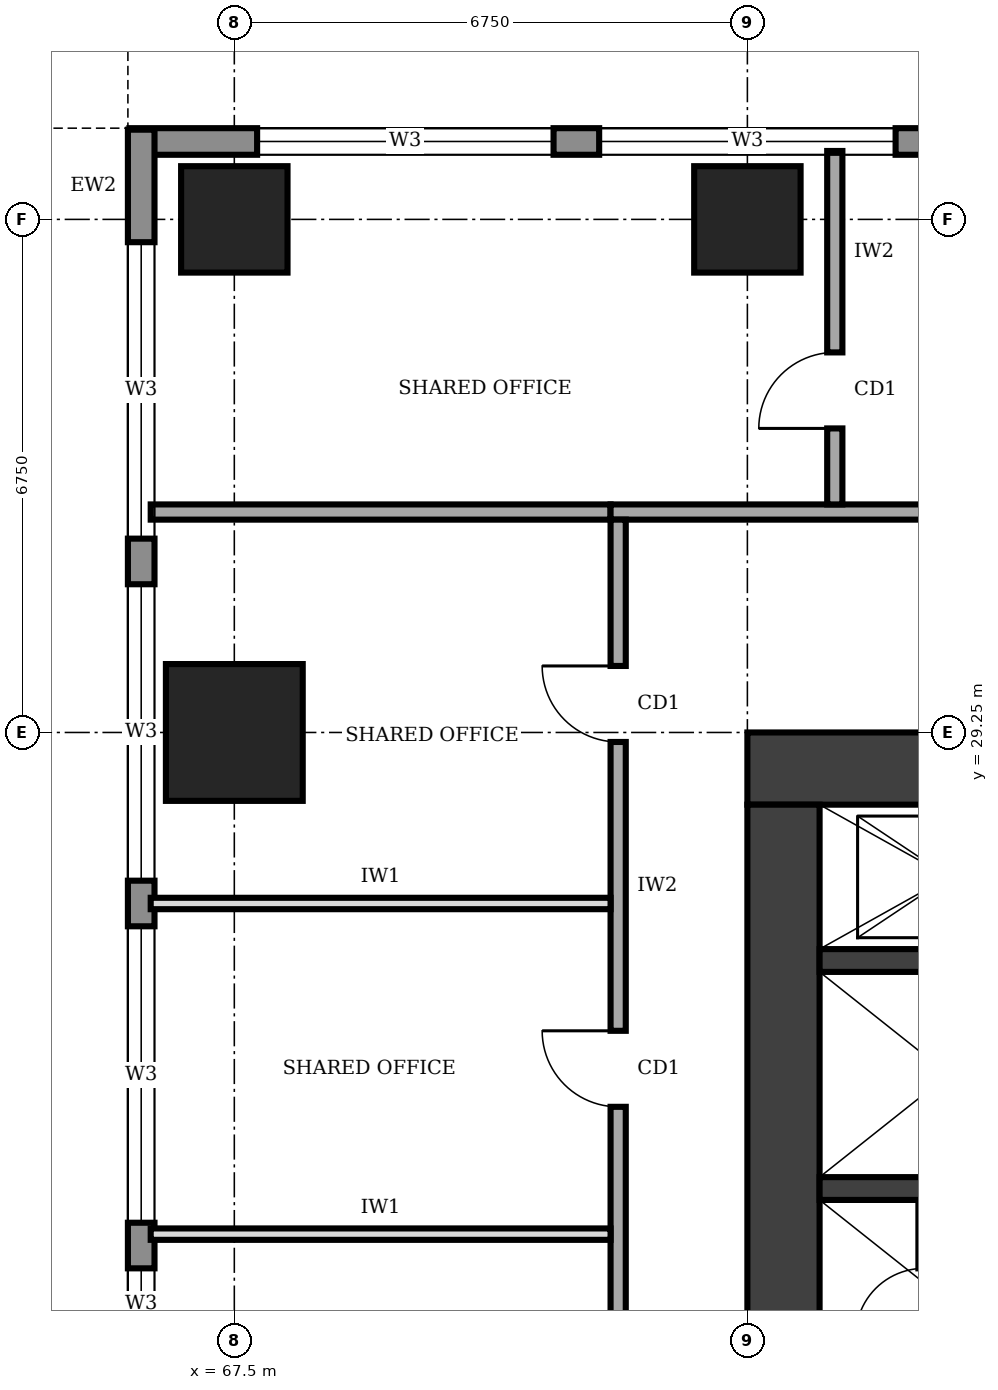
"""IFC4 building model, lengths in metres.
Left out: names, types, materials, properties, quantities, classifications, styles, units other than length and angle.
Written with IfcOpenShell. Run it as: python <this file> out.ifc"""

import sys

from ifc_helpers import new_model, si_unit, direction, frame, frame_2d, origin, origin_2d, place, context, subcontext, project, spatial, rectangle, extrude, element, fill, save


model = new_model("IFC4")
c1 = context("Model", 3, precision=1e-05, world=origin(), true_north=direction((0.0, 1.0)))
c2 = subcontext(c1, "Body", "Model", "MODEL_VIEW")
j1 = project(units=[si_unit("LENGTHUNIT", "METRE"), si_unit("PLANEANGLEUNIT", "RADIAN")], contexts=[c1])
p1 = place(None, origin())
s1 = spatial("IfcSite", under=j1, at=p1, CompositionType="ELEMENT")
p2 = place(p1, origin())
s2 = spatial("IfcBuilding", under=s1, at=p2, CompositionType="ELEMENT")
p3 = place(p2, frame((0.0, 0.0, 177.0)))
s3 = spatial("IfcBuildingStorey", under=s2, at=p3, CompositionType="ELEMENT", Elevation=177.0)
p4 = place(p3, frame((87.75, 28.775, 0.0), z_axis=(0.0, 0.0, 1.0), x_axis=(-1.0, 0.0, 0.0)))
e1 = element("IfcWall", 1, at=p4, inside=s3, PredefinedType="SHEAR", context=c2, shape_type="SweptSolid", body=[
    extrude(rectangle(XDim=13.5, YDim=0.95, at=frame_2d((6.75, 0.0))), origin(), (0.0, 0.0, 1.0), 4.0),
])
p5 = place(p4, frame((4.75, 0.0, 0.0)))
e2 = element("IfcOpeningElement", 2, at=p5, cuts=e1, PredefinedType="OPENING", context=c2, shape_type="SweptSolid", body=[
    extrude(rectangle(XDim=1.8, YDim=2.1, at=frame_2d((0.9, 1.05))), frame((0.0, 0.485, 0.0), z_axis=(0.0, -1.0, 0.0), x_axis=(1.0, 0.0, 0.0)), (0.0, 0.0, 1.0), 0.97),
])
p6 = place(p3, frame((74.725, 28.3, 0.0), z_axis=(0.0, 0.0, 1.0), x_axis=(0.0, -1.0, 0.0)))
e3 = element("IfcWall", 3, at=p6, inside=s3, PredefinedType="SHEAR", context=c2, shape_type="SweptSolid", body=[
    extrude(rectangle(XDim=16.1, YDim=0.95, at=frame_2d((8.05, 0.0))), origin(), (0.0, 0.0, 1.0), 4.0),
])
for number, where, z_axis, x_axis in (
    (4, (75.2, 23.25, 0.0), (0.0, 0.0, 1.0), (1.0, 0.0, 0.0)),
    (5, (75.2, 26.25, 0.0), (0.0, 0.0, 1.0), (1.0, 0.0, 0.0)),
):
    element("IfcWall", number, at=place(p3, frame(where, z_axis=z_axis, x_axis=x_axis)), inside=s3, PredefinedType="SHEAR", context=c2, shape_type="SweptSolid", body=[
        extrude(rectangle(XDim=3.4, YDim=0.3, at=frame_2d((1.7, 0.0))), origin(), (0.0, 0.0, 1.0), 4.0),
    ])
p7 = place(p3, frame((67.5, 29.25, 0.0), z_axis=(0.0, 0.0, 1.0), x_axis=(1.0, 0.0, 0.0)))
e6 = element("IfcColumn", 6, at=p7, inside=s3, PredefinedType="COLUMN", context=c2, shape_type="SweptSolid", body=[
    extrude(rectangle(XDim=1.8, YDim=1.8, at=origin_2d()), origin(), (0.0, 0.0, 1.0), 4.0),
])
for number, where, z_axis, x_axis in (
    (7, (67.5, 36.0, 0.0), (0.0, 0.0, 1.0), (1.0, 0.0, 0.0)),
    (8, (74.25, 36.0, 0.0), (0.0, 0.0, 1.0), (1.0, 0.0, 0.0)),
):
    element("IfcColumn", number, at=place(p3, frame(where, z_axis=z_axis, x_axis=x_axis)), inside=s3, PredefinedType="COLUMN", context=c2, shape_type="SweptSolid", body=[
        extrude(rectangle(XDim=1.4, YDim=1.4, at=origin_2d()), origin(), (0.0, 0.0, 1.0), 4.0),
    ])
p8 = place(p3, frame((96.03, 37.025, 0.0), z_axis=(0.0, 0.0, 1.0), x_axis=(-1.0, 0.0, 0.0)))
e9 = element("IfcWall", 9, at=p8, inside=s3, PredefinedType="STANDARD", context=c2, shape_type="SweptSolid", body=[
    extrude(rectangle(XDim=29.91, YDim=0.35, at=frame_2d((14.955, 0.0))), origin(), (0.0, 0.0, 1.0), 3.75),
])
p9 = place(p8, frame((24.33, 0.0, 0.95)))
e10 = element("IfcOpeningElement", 10, at=p9, cuts=e9, PredefinedType="OPENING", context=c2, shape_type="SweptSolid", body=[
    extrude(rectangle(XDim=3.9, YDim=1.8, at=frame_2d((1.95, 0.9))), frame((0.0, 0.185, 0.0), z_axis=(0.0, -1.0, 0.0), x_axis=(1.0, 0.0, 0.0)), (0.0, 0.0, 1.0), 0.37),
])
p10 = place(p8, frame((19.83, 0.0, 0.95)))
e11 = element("IfcOpeningElement", 11, at=p10, cuts=e9, PredefinedType="OPENING", context=c2, shape_type="SweptSolid", body=[
    extrude(rectangle(XDim=3.9, YDim=1.8, at=frame_2d((1.95, 0.9))), frame((0.0, 0.185, 0.0), z_axis=(0.0, -1.0, 0.0), x_axis=(1.0, 0.0, 0.0)), (0.0, 0.0, 1.0), 0.37),
])
p11 = place(p8, frame((15.33, 0.0, 0.95)))
e12 = element("IfcOpeningElement", 12, at=p11, cuts=e9, PredefinedType="OPENING", context=c2, shape_type="SweptSolid", body=[
    extrude(rectangle(XDim=3.9, YDim=1.8, at=frame_2d((1.95, 0.9))), frame((0.0, 0.185, 0.0), z_axis=(0.0, -1.0, 0.0), x_axis=(1.0, 0.0, 0.0)), (0.0, 0.0, 1.0), 0.37),
])
p12 = place(p8, frame((10.83, 0.0, 0.95)))
e13 = element("IfcOpeningElement", 13, at=p12, cuts=e9, PredefinedType="OPENING", context=c2, shape_type="SweptSolid", body=[
    extrude(rectangle(XDim=3.9, YDim=1.8, at=frame_2d((1.95, 0.9))), frame((0.0, 0.185, 0.0), z_axis=(0.0, -1.0, 0.0), x_axis=(1.0, 0.0, 0.0)), (0.0, 0.0, 1.0), 0.37),
])
p13 = place(p8, frame((6.33, 0.0, 0.95)))
e14 = element("IfcOpeningElement", 14, at=p13, cuts=e9, PredefinedType="OPENING", context=c2, shape_type="SweptSolid", body=[
    extrude(rectangle(XDim=3.9, YDim=1.8, at=frame_2d((1.95, 0.9))), frame((0.0, 0.185, 0.0), z_axis=(0.0, -1.0, 0.0), x_axis=(1.0, 0.0, 0.0)), (0.0, 0.0, 1.0), 0.37),
])
p14 = place(p8, frame((1.83, 0.0, 0.95)))
e15 = element("IfcOpeningElement", 15, at=p14, cuts=e9, PredefinedType="OPENING", context=c2, shape_type="SweptSolid", body=[
    extrude(rectangle(XDim=3.9, YDim=1.8, at=frame_2d((1.95, 0.9))), frame((0.0, 0.185, 0.0), z_axis=(0.0, -1.0, 0.0), x_axis=(1.0, 0.0, 0.0)), (0.0, 0.0, 1.0), 0.37),
])
p15 = place(p3, frame((66.275, 37.18, 0.0), z_axis=(0.0, 0.0, 1.0), x_axis=(0.0, -1.0, 0.0)))
e16 = element("IfcWall", 16, at=p15, inside=s3, PredefinedType="STANDARD", context=c2, shape_type="SweptSolid", body=[
    extrude(rectangle(XDim=33.86, YDim=0.35, at=frame_2d((16.93, 0.0))), origin(), (0.0, 0.0, 1.0), 3.75),
])
p16 = place(p15, frame((28.48, 0.0, 0.95)))
e17 = element("IfcOpeningElement", 17, at=p16, cuts=e16, PredefinedType="OPENING", context=c2, shape_type="SweptSolid", body=[
    extrude(rectangle(XDim=3.9, YDim=1.8, at=frame_2d((1.95, 0.9))), frame((0.0, 0.185, 0.0), z_axis=(0.0, -1.0, 0.0), x_axis=(1.0, 0.0, 0.0)), (0.0, 0.0, 1.0), 0.37),
])
p17 = place(p15, frame((23.98, 0.0, 0.95)))
e18 = element("IfcOpeningElement", 18, at=p17, cuts=e16, PredefinedType="OPENING", context=c2, shape_type="SweptSolid", body=[
    extrude(rectangle(XDim=3.9, YDim=1.8, at=frame_2d((1.95, 0.9))), frame((0.0, 0.185, 0.0), z_axis=(0.0, -1.0, 0.0), x_axis=(1.0, 0.0, 0.0)), (0.0, 0.0, 1.0), 0.37),
])
p18 = place(p15, frame((19.48, 0.0, 0.95)))
e19 = element("IfcOpeningElement", 19, at=p18, cuts=e16, PredefinedType="OPENING", context=c2, shape_type="SweptSolid", body=[
    extrude(rectangle(XDim=3.9, YDim=1.8, at=frame_2d((1.95, 0.9))), frame((0.0, 0.185, 0.0), z_axis=(0.0, -1.0, 0.0), x_axis=(1.0, 0.0, 0.0)), (0.0, 0.0, 1.0), 0.37),
])
p19 = place(p15, frame((14.98, 0.0, 0.95)))
e20 = element("IfcOpeningElement", 20, at=p19, cuts=e16, PredefinedType="OPENING", context=c2, shape_type="SweptSolid", body=[
    extrude(rectangle(XDim=3.9, YDim=1.8, at=frame_2d((1.95, 0.9))), frame((0.0, 0.185, 0.0), z_axis=(0.0, -1.0, 0.0), x_axis=(1.0, 0.0, 0.0)), (0.0, 0.0, 1.0), 0.37),
])
p20 = place(p15, frame((10.48, 0.0, 0.95)))
e21 = element("IfcOpeningElement", 21, at=p20, cuts=e16, PredefinedType="OPENING", context=c2, shape_type="SweptSolid", body=[
    extrude(rectangle(XDim=3.9, YDim=1.8, at=frame_2d((1.95, 0.9))), frame((0.0, 0.185, 0.0), z_axis=(0.0, -1.0, 0.0), x_axis=(1.0, 0.0, 0.0)), (0.0, 0.0, 1.0), 0.37),
])
p21 = place(p15, frame((5.98, 0.0, 0.95)))
e22 = element("IfcOpeningElement", 22, at=p21, cuts=e16, PredefinedType="OPENING", context=c2, shape_type="SweptSolid", body=[
    extrude(rectangle(XDim=3.9, YDim=1.8, at=frame_2d((1.95, 0.9))), frame((0.0, 0.185, 0.0), z_axis=(0.0, -1.0, 0.0), x_axis=(1.0, 0.0, 0.0)), (0.0, 0.0, 1.0), 0.37),
])
p22 = place(p15, frame((1.48, 0.0, 0.95)))
e23 = element("IfcOpeningElement", 23, at=p22, cuts=e16, PredefinedType="OPENING", context=c2, shape_type="SweptSolid", body=[
    extrude(rectangle(XDim=3.9, YDim=1.8, at=frame_2d((1.95, 0.9))), frame((0.0, 0.185, 0.0), z_axis=(0.0, -1.0, 0.0), x_axis=(1.0, 0.0, 0.0)), (0.0, 0.0, 1.0), 0.37),
])
p23 = place(p3, frame((89.35, 32.15, 0.0), z_axis=(0.0, 0.0, 1.0), x_axis=(-1.0, 0.0, 0.0)))
e24 = element("IfcWall", 24, at=p23, inside=s3, PredefinedType="SOLIDWALL", context=c2, shape_type="SweptSolid", body=[
    extrude(rectangle(XDim=16.9, YDim=0.2, at=frame_2d((8.45, 0.0))), origin(), (0.0, 0.0, 1.0), 3.75),
])
p24 = place(p23, frame((3.575, 0.0, 0.0)))
e25 = element("IfcOpeningElement", 25, at=p24, cuts=e24, PredefinedType="OPENING", context=c2, shape_type="SweptSolid", body=[
    extrude(rectangle(XDim=1.0, YDim=2.1, at=frame_2d((0.5, 1.05))), frame((0.0, 0.11, 0.0), z_axis=(0.0, -1.0, 0.0), x_axis=(1.0, 0.0, 0.0)), (0.0, 0.0, 1.0), 0.22),
])
p25 = place(p3, frame((72.55, 32.05, 0.0), z_axis=(0.0, 0.0, 1.0), x_axis=(0.0, -1.0, 0.0)))
e26 = element("IfcWall", 26, at=p25, inside=s3, PredefinedType="SOLIDWALL", context=c2, shape_type="SweptSolid", body=[
    extrude(rectangle(XDim=23.05, YDim=0.2, at=frame_2d((11.525, 0.0))), origin(), (0.0, 0.0, 1.0), 3.75),
])
p26 = place(p25, frame((20.3, 0.0, 0.0)))
e27 = element("IfcOpeningElement", 27, at=p26, cuts=e26, PredefinedType="OPENING", context=c2, shape_type="SweptSolid", body=[
    extrude(rectangle(XDim=1.0, YDim=2.1, at=frame_2d((0.5, 1.05))), frame((0.0, 0.11, 0.0), z_axis=(0.0, -1.0, 0.0), x_axis=(1.0, 0.0, 0.0)), (0.0, 0.0, 1.0), 0.22),
])
p27 = place(p25, frame((15.875, 0.0, 0.0)))
e28 = element("IfcOpeningElement", 28, at=p27, cuts=e26, PredefinedType="OPENING", context=c2, shape_type="SweptSolid", body=[
    extrude(rectangle(XDim=1.0, YDim=2.1, at=frame_2d((0.5, 1.05))), frame((0.0, 0.11, 0.0), z_axis=(0.0, -1.0, 0.0), x_axis=(1.0, 0.0, 0.0)), (0.0, 0.0, 1.0), 0.22),
])
p28 = place(p25, frame((11.3, 0.0, 0.0)))
e29 = element("IfcOpeningElement", 29, at=p28, cuts=e26, PredefinedType="OPENING", context=c2, shape_type="SweptSolid", body=[
    extrude(rectangle(XDim=1.0, YDim=2.1, at=frame_2d((0.5, 1.05))), frame((0.0, 0.11, 0.0), z_axis=(0.0, -1.0, 0.0), x_axis=(1.0, 0.0, 0.0)), (0.0, 0.0, 1.0), 0.22),
])
p29 = place(p25, frame((6.725, 0.0, 0.0)))
e30 = element("IfcOpeningElement", 30, at=p29, cuts=e26, PredefinedType="OPENING", context=c2, shape_type="SweptSolid", body=[
    extrude(rectangle(XDim=1.0, YDim=2.1, at=frame_2d((0.5, 1.05))), frame((0.0, 0.11, 0.0), z_axis=(0.0, -1.0, 0.0), x_axis=(1.0, 0.0, 0.0)), (0.0, 0.0, 1.0), 0.22),
])
p30 = place(p25, frame((1.925, 0.0, 0.0)))
e31 = element("IfcOpeningElement", 31, at=p30, cuts=e26, PredefinedType="OPENING", context=c2, shape_type="SweptSolid", body=[
    extrude(rectangle(XDim=1.0, YDim=2.1, at=frame_2d((0.5, 1.05))), frame((0.0, 0.11, 0.0), z_axis=(0.0, -1.0, 0.0), x_axis=(1.0, 0.0, 0.0)), (0.0, 0.0, 1.0), 0.22),
])
p31 = place(p3, frame((75.4, 32.25, 0.0), z_axis=(0.0, 0.0, 1.0), x_axis=(0.0, 1.0, 0.0)))
e32 = element("IfcWall", 32, at=p31, inside=s3, PredefinedType="SOLIDWALL", context=c2, shape_type="SweptSolid", body=[
    extrude(rectangle(XDim=4.65, YDim=0.2, at=frame_2d((2.325, 0.0))), origin(), (0.0, 0.0, 1.0), 3.75),
])
p32 = place(p31, frame((1.0, 0.0, 0.0)))
e33 = element("IfcOpeningElement", 33, at=p32, cuts=e32, PredefinedType="OPENING", context=c2, shape_type="SweptSolid", body=[
    extrude(rectangle(XDim=1.0, YDim=2.1, at=frame_2d((0.5, 1.05))), frame((0.0, 0.11, 0.0), z_axis=(0.0, -1.0, 0.0), x_axis=(1.0, 0.0, 0.0)), (0.0, 0.0, 1.0), 0.22),
])
p33 = place(p3, frame((66.4, 32.15, 0.0), z_axis=(0.0, 0.0, 1.0), x_axis=(1.0, 0.0, 0.0)))
e34 = element("IfcWall", 34, at=p33, inside=s3, PredefinedType="SOLIDWALL", context=c2, shape_type="SweptSolid", body=[
    extrude(rectangle(XDim=6.05, YDim=0.2, at=frame_2d((3.025, 0.0))), origin(), (0.0, 0.0, 1.0), 3.75),
])
for number, where, z_axis, x_axis in (
    (35, (66.4, 22.65, 0.0), (0.0, 0.0, 1.0), (1.0, 0.0, 0.0)),
    (36, (66.4, 27.0, 0.0), (0.0, 0.0, 1.0), (1.0, 0.0, 0.0)),
):
    element("IfcWall", number, at=place(p3, frame(where, z_axis=z_axis, x_axis=x_axis)), inside=s3, PredefinedType="PARTITIONING", context=c2, shape_type="SweptSolid", body=[
        extrude(rectangle(XDim=6.05, YDim=0.15, at=frame_2d((3.025, 0.0))), origin(), (0.0, 0.0, 1.0), 3.75),
    ])
p34 = place(p9, origin())
e37 = element("IfcWindow", 37, at=p34, inside=s3, PartitioningType="SINGLE_PANEL", PredefinedType="WINDOW", context=c2, shape_type="SweptSolid", body=[
    extrude(rectangle(XDim=3.9, YDim=1.8, at=frame_2d((1.95, 0.9))), frame((0.0, 0.03, 0.0), z_axis=(0.0, -1.0, 0.0), x_axis=(1.0, 0.0, 0.0)), (0.0, 0.0, 1.0), 0.06),
])
fill(e10, e37)
p35 = place(p10, origin())
e38 = element("IfcWindow", 38, at=p35, inside=s3, PartitioningType="SINGLE_PANEL", PredefinedType="WINDOW", context=c2, shape_type="SweptSolid", body=[
    extrude(rectangle(XDim=3.9, YDim=1.8, at=frame_2d((1.95, 0.9))), frame((0.0, 0.03, 0.0), z_axis=(0.0, -1.0, 0.0), x_axis=(1.0, 0.0, 0.0)), (0.0, 0.0, 1.0), 0.06),
])
fill(e11, e38)
p36 = place(p19, origin())
e39 = element("IfcWindow", 39, at=p36, inside=s3, PartitioningType="SINGLE_PANEL", PredefinedType="WINDOW", context=c2, shape_type="SweptSolid", body=[
    extrude(rectangle(XDim=3.9, YDim=1.8, at=frame_2d((1.95, 0.9))), frame((0.0, 0.03, 0.0), z_axis=(0.0, -1.0, 0.0), x_axis=(1.0, 0.0, 0.0)), (0.0, 0.0, 1.0), 0.06),
])
fill(e20, e39)
p37 = place(p20, origin())
e40 = element("IfcWindow", 40, at=p37, inside=s3, PartitioningType="SINGLE_PANEL", PredefinedType="WINDOW", context=c2, shape_type="SweptSolid", body=[
    extrude(rectangle(XDim=3.9, YDim=1.8, at=frame_2d((1.95, 0.9))), frame((0.0, 0.03, 0.0), z_axis=(0.0, -1.0, 0.0), x_axis=(1.0, 0.0, 0.0)), (0.0, 0.0, 1.0), 0.06),
])
fill(e21, e40)
p38 = place(p21, origin())
e41 = element("IfcWindow", 41, at=p38, inside=s3, PartitioningType="SINGLE_PANEL", PredefinedType="WINDOW", context=c2, shape_type="SweptSolid", body=[
    extrude(rectangle(XDim=3.9, YDim=1.8, at=frame_2d((1.95, 0.9))), frame((0.0, 0.03, 0.0), z_axis=(0.0, -1.0, 0.0), x_axis=(1.0, 0.0, 0.0)), (0.0, 0.0, 1.0), 0.06),
])
fill(e22, e41)
p39 = place(p22, origin())
e42 = element("IfcWindow", 42, at=p39, inside=s3, PartitioningType="SINGLE_PANEL", PredefinedType="WINDOW", context=c2, shape_type="SweptSolid", body=[
    extrude(rectangle(XDim=3.9, YDim=1.8, at=frame_2d((1.95, 0.9))), frame((0.0, 0.03, 0.0), z_axis=(0.0, -1.0, 0.0), x_axis=(1.0, 0.0, 0.0)), (0.0, 0.0, 1.0), 0.06),
])
fill(e23, e42)
p40 = place(p29, frame((1.0, 0.0, 0.0), z_axis=(0.0, 0.0, 1.0), x_axis=(-1.0, 0.0, 0.0)))
e43 = element("IfcDoor", 43, at=p40, inside=s3, OperationType="SINGLE_SWING_RIGHT", PredefinedType="DOOR", context=c2, shape_type="SweptSolid", body=[
    extrude(rectangle(XDim=1.0, YDim=2.1, at=frame_2d((0.5, 1.05))), frame((0.0, 0.025, 0.0), z_axis=(0.0, -1.0, 0.0), x_axis=(1.0, 0.0, 0.0)), (0.0, 0.0, 1.0), 0.05),
])
fill(e30, e43)
p41 = place(p30, frame((1.0, 0.0, 0.0), z_axis=(0.0, 0.0, 1.0), x_axis=(-1.0, 0.0, 0.0)))
e44 = element("IfcDoor", 44, at=p41, inside=s3, OperationType="SINGLE_SWING_RIGHT", PredefinedType="DOOR", context=c2, shape_type="SweptSolid", body=[
    extrude(rectangle(XDim=1.0, YDim=2.1, at=frame_2d((0.5, 1.05))), frame((0.0, 0.025, 0.0), z_axis=(0.0, -1.0, 0.0), x_axis=(1.0, 0.0, 0.0)), (0.0, 0.0, 1.0), 0.05),
])
fill(e31, e44)
p42 = place(p32, origin())
e45 = element("IfcDoor", 45, at=p42, inside=s3, OperationType="SINGLE_SWING_LEFT", PredefinedType="DOOR", context=c2, shape_type="SweptSolid", body=[
    extrude(rectangle(XDim=1.0, YDim=2.1, at=frame_2d((0.5, 1.05))), frame((0.0, 0.025, 0.0), z_axis=(0.0, -1.0, 0.0), x_axis=(1.0, 0.0, 0.0)), (0.0, 0.0, 1.0), 0.05),
])
fill(e33, e45)
save(model, sys.argv[1])
